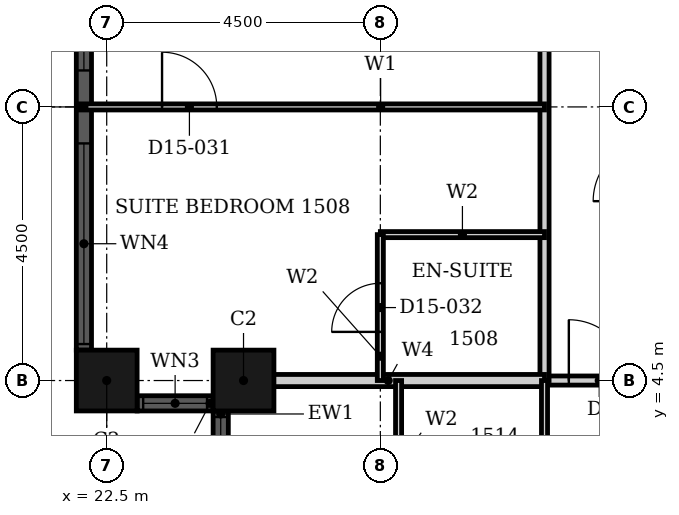
"""IFC4 building model, lengths in metres.
Left out: names, types, materials, properties, quantities, classifications, styles, units other than length and angle.
Written with IfcOpenShell. Run it as: python <this file> out.ifc"""

import sys

from ifc_helpers import new_model, si_unit, direction, frame, frame_2d, origin, origin_2d, place, context, subcontext, project, spatial, rectangle, hollow_rectangle, extrude, element, fill, save


model = new_model("IFC4")
c1 = context("Model", 3, precision=1e-05, world=origin(), true_north=direction((0.0, 1.0)))
c2 = subcontext(c1, "Body", "Model", "MODEL_VIEW")
j1 = project(units=[si_unit("LENGTHUNIT", "METRE"), si_unit("PLANEANGLEUNIT", "RADIAN")], contexts=[c1])
p1 = place(None, origin())
s1 = spatial("IfcSite", under=j1, at=p1, CompositionType="ELEMENT")
p2 = place(p1, origin())
s2 = spatial("IfcBuilding", under=s1, at=p2, CompositionType="ELEMENT")
p3 = place(p2, frame((0.0, 0.0, 67.2)))
s3 = spatial("IfcBuildingStorey", under=s2, at=p3, CompositionType="ELEMENT", Elevation=67.2)
for number, where, z_axis, x_axis in (
    (1, (22.5, 4.5, 0.0), (0.0, 0.0, 1.0), (1.0, 0.0, 0.0)),
    (2, (24.75, 4.5, 0.0), (0.0, 0.0, 1.0), (1.0, 0.0, 0.0)),
):
    element("IfcColumn", number, at=place(p3, frame(where, z_axis=z_axis, x_axis=x_axis)), inside=s3, PredefinedType="COLUMN", context=c2, shape_type="SweptSolid", body=[
        extrude(hollow_rectangle(XDim=1.0, YDim=1.0, WallThickness=0.032, at=origin_2d()), origin(), (0.0, 0.0, 1.0), 3.6),
    ])
p4 = place(p3, frame((23.0, 4.125, 0.0), z_axis=(0.0, 0.0, 1.0), x_axis=(1.0, 0.0, 0.0)))
e3 = element("IfcWall", 3, at=p4, inside=s3, PredefinedType="SOLIDWALL", context=c2, shape_type="SweptSolid", body=[
    extrude(rectangle(XDim=1.25, YDim=0.25, at=frame_2d((0.625, 0.0))), origin(), (0.0, 0.0, 1.0), 3.6),
])
p5 = place(p4, frame((0.1, 0.0, 0.9)))
e4 = element("IfcOpeningElement", 4, at=p5, cuts=e3, PredefinedType="OPENING", context=c2, shape_type="SweptSolid", body=[
    extrude(rectangle(XDim=1.05, YDim=2.08, at=frame_2d((0.525, 1.04))), frame((0.0, 0.135, 0.0), z_axis=(0.0, -1.0, 0.0), x_axis=(1.0, 0.0, 0.0)), (0.0, 0.0, 1.0), 0.27),
])
p6 = place(p3, frame((24.375, 4.0, 0.0), z_axis=(0.0, 0.0, 1.0), x_axis=(0.0, -1.0, 0.0)))
e5 = element("IfcWall", 5, at=p6, inside=s3, PredefinedType="SOLIDWALL", context=c2, shape_type="SweptSolid", body=[
    extrude(rectangle(XDim=1.25, YDim=0.25, at=frame_2d((0.625, 0.0))), origin(), (0.0, 0.0, 1.0), 3.6),
])
p7 = place(p6, frame((0.1, 0.0, 0.9)))
e6 = element("IfcOpeningElement", 6, at=p7, cuts=e5, PredefinedType="OPENING", context=c2, shape_type="SweptSolid", body=[
    extrude(rectangle(XDim=1.05, YDim=2.08, at=frame_2d((0.525, 1.04))), frame((0.0, 0.135, 0.0), z_axis=(0.0, -1.0, 0.0), x_axis=(1.0, 0.0, 0.0)), (0.0, 0.0, 1.0), 0.27),
])
p8 = place(p3, frame((22.125, 13.0, 0.0), z_axis=(0.0, 0.0, 1.0), x_axis=(0.0, -1.0, 0.0)))
e7 = element("IfcWall", 7, at=p8, inside=s3, PredefinedType="SOLIDWALL", context=c2, shape_type="SweptSolid", body=[
    extrude(rectangle(XDim=8.0, YDim=0.25, at=frame_2d((4.0, 0.0))), origin(), (0.0, 0.0, 1.0), 3.6),
])
p9 = place(p8, frame((0.1, 0.0, 0.9)))
e8 = element("IfcOpeningElement", 8, at=p9, cuts=e7, PredefinedType="OPENING", context=c2, shape_type="SweptSolid", body=[
    extrude(rectangle(XDim=3.3, YDim=2.08, at=frame_2d((1.65, 1.04))), frame((0.0, 0.135, 0.0), z_axis=(0.0, -1.0, 0.0), x_axis=(1.0, 0.0, 0.0)), (0.0, 0.0, 1.0), 0.27),
])
p10 = place(p8, frame((4.6, 0.0, 0.9)))
e9 = element("IfcOpeningElement", 9, at=p10, cuts=e7, PredefinedType="OPENING", context=c2, shape_type="SweptSolid", body=[
    extrude(rectangle(XDim=3.3, YDim=2.08, at=frame_2d((1.65, 1.04))), frame((0.0, 0.135, 0.0), z_axis=(0.0, -1.0, 0.0), x_axis=(1.0, 0.0, 0.0)), (0.0, 0.0, 1.0), 0.27),
])
p11 = place(p3, frame((29.7, 4.5, 0.0), z_axis=(0.0, 0.0, 1.0), x_axis=(1.0, 0.0, 0.0)))
e10 = element("IfcWall", 10, at=p11, inside=s3, PredefinedType="PARTITIONING", context=c2, shape_type="SweptSolid", body=[
    extrude(rectangle(XDim=1.8, YDim=0.15, at=frame_2d((0.9, 0.0))), origin(), (0.0, 0.0, 1.0), 3.3),
])
p12 = place(p11, frame((0.4, 0.0, 0.0)))
e11 = element("IfcOpeningElement", 11, at=p12, cuts=e10, PredefinedType="OPENING", context=c2, shape_type="SweptSolid", body=[
    extrude(rectangle(XDim=1.0, YDim=2.1, at=frame_2d((0.5, 1.05))), frame((0.0, 0.085, 0.0), z_axis=(0.0, -1.0, 0.0), x_axis=(1.0, 0.0, 0.0)), (0.0, 0.0, 1.0), 0.17),
])
p13 = place(p3, frame((29.7, 4.5, 0.0), z_axis=(0.0, 0.0, 1.0), x_axis=(0.0, 1.0, 0.0)))
e12 = element("IfcWall", 12, at=p13, inside=s3, PredefinedType="PARTITIONING", context=c2, shape_type="SweptSolid", body=[
    extrude(rectangle(XDim=16.2, YDim=0.15, at=frame_2d((8.1, 0.0))), origin(), (0.0, 0.0, 1.0), 3.3),
])
p14 = place(p13, frame((6.25, 0.0, 0.0)))
e13 = element("IfcOpeningElement", 13, at=p14, cuts=e12, PredefinedType="OPENING", context=c2, shape_type="SweptSolid", body=[
    extrude(rectangle(XDim=1.0, YDim=2.1, at=frame_2d((0.5, 1.05))), frame((0.0, 0.085, 0.0), z_axis=(0.0, -1.0, 0.0), x_axis=(1.0, 0.0, 0.0)), (0.0, 0.0, 1.0), 0.17),
])
p15 = place(p3, frame((22.06, 9.0, 0.0), z_axis=(0.0, 0.0, 1.0), x_axis=(1.0, 0.0, 0.0)))
e14 = element("IfcWall", 14, at=p15, inside=s3, PredefinedType="PARTITIONING", context=c2, shape_type="SweptSolid", body=[
    extrude(rectangle(XDim=7.64, YDim=0.1, at=frame_2d((3.82, 0.0))), origin(), (0.0, 0.0, 1.0), 3.3),
])
p16 = place(p15, frame((1.35, 0.0, 0.0)))
e15 = element("IfcOpeningElement", 15, at=p16, cuts=e14, PredefinedType="OPENING", context=c2, shape_type="SweptSolid", body=[
    extrude(rectangle(XDim=0.9, YDim=2.1, at=frame_2d((0.45, 1.05))), frame((0.0, 0.06, 0.0), z_axis=(0.0, -1.0, 0.0), x_axis=(1.0, 0.0, 0.0)), (0.0, 0.0, 1.0), 0.12),
])
p17 = place(p3, frame((24.56, 4.5, 0.0), z_axis=(0.0, 0.0, 1.0), x_axis=(1.0, 0.0, 0.0)))
e16 = element("IfcWall", 16, at=p17, inside=s3, PredefinedType="PARTITIONING", context=c2, shape_type="SweptSolid", body=[
    extrude(rectangle(XDim=5.14, YDim=0.2, at=frame_2d((2.57, 0.0))), origin(), (0.0, 0.0, 1.0), 3.3),
])
p18 = place(p3, frame((27.0, 6.9, 0.0), z_axis=(0.0, 0.0, 1.0), x_axis=(1.0, 0.0, 0.0)))
e17 = element("IfcWall", 17, at=p18, inside=s3, PredefinedType="PARTITIONING", context=c2, shape_type="SweptSolid", body=[
    extrude(rectangle(XDim=2.7, YDim=0.1, at=frame_2d((1.35, 0.0))), origin(), (0.0, 0.0, 1.0), 3.3),
])
p19 = place(p3, frame((27.0, 4.5, 0.0), z_axis=(0.0, 0.0, 1.0), x_axis=(0.0, 1.0, 0.0)))
e18 = element("IfcWall", 18, at=p19, inside=s3, PredefinedType="PARTITIONING", context=c2, shape_type="SweptSolid", body=[
    extrude(rectangle(XDim=2.4, YDim=0.1, at=frame_2d((1.2, 0.0))), origin(), (0.0, 0.0, 1.0), 2.58),
])
p20 = place(p19, frame((0.8, 0.0, 0.0)))
e19 = element("IfcOpeningElement", 19, at=p20, cuts=e18, PredefinedType="OPENING", context=c2, shape_type="SweptSolid", body=[
    extrude(rectangle(XDim=0.8, YDim=2.1, at=frame_2d((0.4, 1.05))), frame((0.0, 0.06, 0.0), z_axis=(0.0, -1.0, 0.0), x_axis=(1.0, 0.0, 0.0)), (0.0, 0.0, 1.0), 0.12),
])
for number, where, z_axis, x_axis in (
    (20, (27.3, 1.8, 0.0), (0.0, 0.0, 1.0), (0.0, 1.0, 0.0)),
    (21, (29.7, 1.8, 0.0), (0.0, 0.0, 1.0), (0.0, 1.0, 0.0)),
):
    element("IfcWall", number, at=place(p3, frame(where, z_axis=z_axis, x_axis=x_axis)), inside=s3, PredefinedType="PARTITIONING", context=c2, shape_type="SweptSolid", body=[
        extrude(rectangle(XDim=2.7, YDim=0.1, at=frame_2d((1.35, 0.0))), origin(), (0.0, 0.0, 1.0), 3.3),
    ])
p21 = place(p5, origin())
e22 = element("IfcWindow", 22, at=p21, inside=s3, PartitioningType="SINGLE_PANEL", PredefinedType="WINDOW", context=c2, shape_type="SweptSolid", body=[
    extrude(rectangle(XDim=1.05, YDim=2.08, at=frame_2d((0.525, 1.04))), frame((0.0, 0.03, 0.0), z_axis=(0.0, -1.0, 0.0), x_axis=(1.0, 0.0, 0.0)), (0.0, 0.0, 1.0), 0.06),
])
fill(e4, e22)
p22 = place(p7, origin())
e23 = element("IfcWindow", 23, at=p22, inside=s3, PartitioningType="SINGLE_PANEL", PredefinedType="WINDOW", context=c2, shape_type="SweptSolid", body=[
    extrude(rectangle(XDim=1.05, YDim=2.08, at=frame_2d((0.525, 1.04))), frame((0.0, 0.03, 0.0), z_axis=(0.0, -1.0, 0.0), x_axis=(1.0, 0.0, 0.0)), (0.0, 0.0, 1.0), 0.06),
])
fill(e6, e23)
p23 = place(p9, origin())
e24 = element("IfcWindow", 24, at=p23, inside=s3, PartitioningType="SINGLE_PANEL", PredefinedType="WINDOW", context=c2, shape_type="SweptSolid", body=[
    extrude(rectangle(XDim=3.3, YDim=2.08, at=frame_2d((1.65, 1.04))), frame((0.0, 0.03, 0.0), z_axis=(0.0, -1.0, 0.0), x_axis=(1.0, 0.0, 0.0)), (0.0, 0.0, 1.0), 0.06),
])
fill(e8, e24)
p24 = place(p10, origin())
e25 = element("IfcWindow", 25, at=p24, inside=s3, PartitioningType="SINGLE_PANEL", PredefinedType="WINDOW", context=c2, shape_type="SweptSolid", body=[
    extrude(rectangle(XDim=3.3, YDim=2.08, at=frame_2d((1.65, 1.04))), frame((0.0, 0.03, 0.0), z_axis=(0.0, -1.0, 0.0), x_axis=(1.0, 0.0, 0.0)), (0.0, 0.0, 1.0), 0.06),
])
fill(e9, e25)
p25 = place(p16, origin())
e26 = element("IfcDoor", 26, at=p25, inside=s3, OperationType="SINGLE_SWING_LEFT", PredefinedType="DOOR", context=c2, shape_type="SweptSolid", body=[
    extrude(rectangle(XDim=0.9, YDim=2.1, at=frame_2d((0.45, 1.05))), frame((0.0, 0.025, 0.0), z_axis=(0.0, -1.0, 0.0), x_axis=(1.0, 0.0, 0.0)), (0.0, 0.0, 1.0), 0.05),
])
fill(e15, e26)
p26 = place(p20, origin())
e27 = element("IfcDoor", 27, at=p26, inside=s3, OperationType="SINGLE_SWING_RIGHT", PredefinedType="DOOR", context=c2, shape_type="SweptSolid", body=[
    extrude(rectangle(XDim=0.8, YDim=2.1, at=frame_2d((0.4, 1.05))), frame((0.0, 0.025, 0.0), z_axis=(0.0, -1.0, 0.0), x_axis=(1.0, 0.0, 0.0)), (0.0, 0.0, 1.0), 0.05),
])
fill(e19, e27)
p27 = place(p12, origin())
e28 = element("IfcDoor", 28, at=p27, inside=s3, OperationType="SINGLE_SWING_RIGHT", PredefinedType="DOOR", context=c2, shape_type="SweptSolid", body=[
    extrude(rectangle(XDim=1.0, YDim=2.1, at=frame_2d((0.5, 1.05))), frame((0.0, 0.025, 0.0), z_axis=(0.0, -1.0, 0.0), x_axis=(1.0, 0.0, 0.0)), (0.0, 0.0, 1.0), 0.05),
])
fill(e11, e28)
save(model, sys.argv[1])
